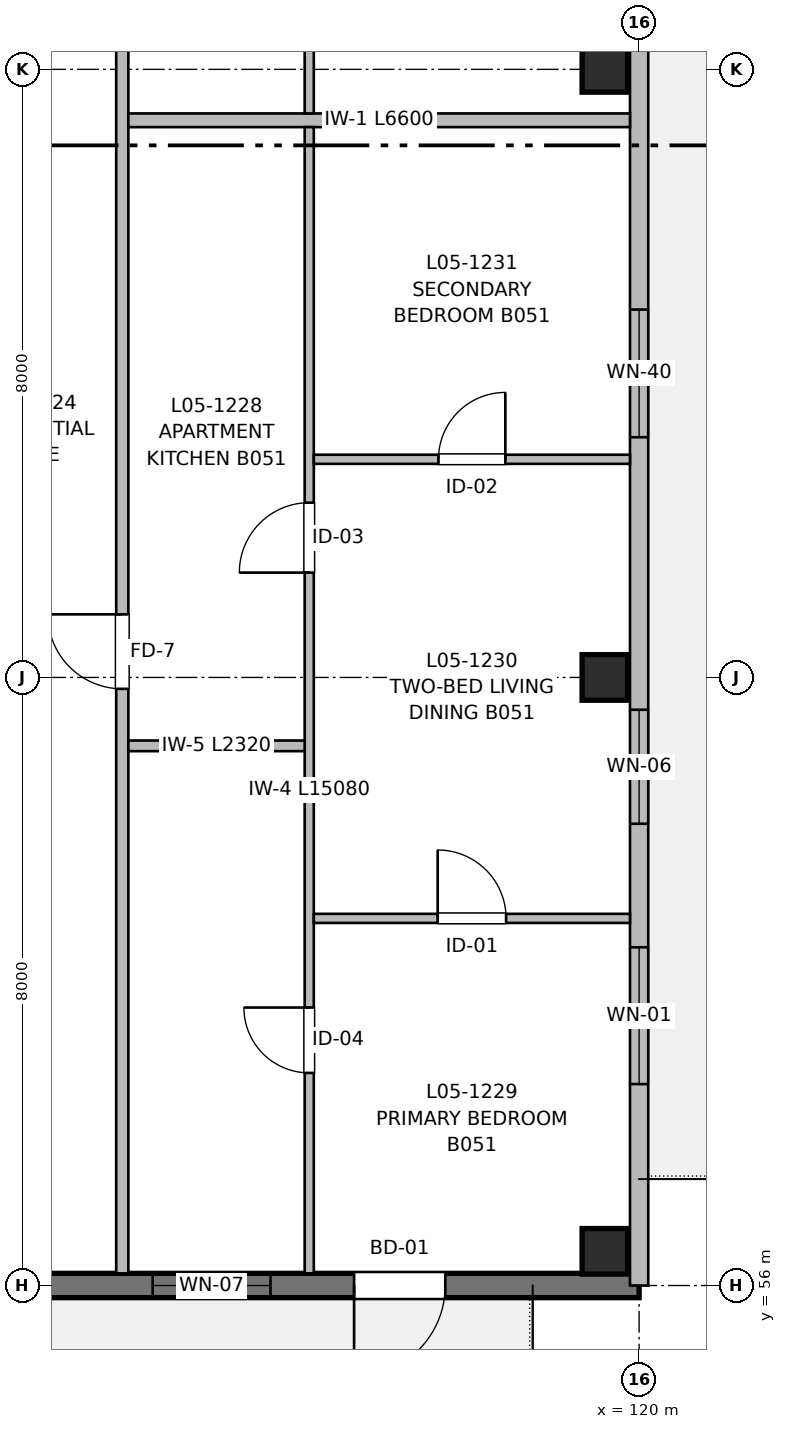
"""IFC4 building model, lengths in metres.
Left out: names, types, materials, properties, quantities, classifications, styles, units other than length and angle.
Written with IfcOpenShell. Run it as: python <this file> out.ifc"""

import sys

from ifc_helpers import new_model, si_unit, direction, frame, frame_2d, origin, origin_2d, place, context, subcontext, project, spatial, rectangle, extrude, element, fill, save


model = new_model("IFC4")
c1 = context("Model", 3, precision=1e-05, world=origin(), true_north=direction((0.0, 1.0)))
c2 = subcontext(c1, "Body", "Model", "MODEL_VIEW")
j1 = project(units=[si_unit("LENGTHUNIT", "METRE"), si_unit("PLANEANGLEUNIT", "RADIAN")], contexts=[c1])
p1 = place(None, origin())
s1 = spatial("IfcSite", under=j1, at=p1, CompositionType="ELEMENT")
p2 = place(p1, origin())
s2 = spatial("IfcBuilding", under=s1, at=p2, CompositionType="ELEMENT")
p3 = place(p2, frame((0.0, 0.0, 16.96)))
s3 = spatial("IfcBuildingStorey", under=s2, at=p3, CompositionType="ELEMENT", Elevation=16.96)
for number, where, z_axis, x_axis in (
    (1, (119.55, 56.45, 0.0), (0.0, 0.0, 1.0), (1.0, 0.0, 0.0)),
    (2, (119.55, 64.0, 0.0), (0.0, 0.0, 1.0), (1.0, 0.0, 0.0)),
    (3, (119.55, 72.0, 0.0), (0.0, 0.0, 1.0), (1.0, 0.0, 0.0)),
):
    element("IfcColumn", number, at=place(p3, frame(where, z_axis=z_axis, x_axis=x_axis)), inside=s3, PredefinedType="COLUMN", context=c2, shape_type="SweptSolid", body=[
        extrude(rectangle(XDim=0.6, YDim=0.6, at=origin_2d()), origin(), (0.0, 0.0, 1.0), 3.2),
    ])
p4 = place(p3, frame((120.0, 56.0, 0.0), z_axis=(0.0, 0.0, 1.0), x_axis=(-1.0, 0.0, 0.0)))
e4 = element("IfcWall", 4, at=p4, inside=s3, PredefinedType="SHEAR", context=c2, shape_type="SweptSolid", body=[
    extrude(rectangle(XDim=16.0, YDim=0.32, at=frame_2d((8.0, 0.0))), origin(), (0.0, 0.0, 1.0), 2.98),
])
p5 = place(p4, frame((2.55, 0.0, 0.0)))
e5 = element("IfcOpeningElement", 5, at=p5, cuts=e4, PredefinedType="OPENING", context=c2, shape_type="SweptSolid", body=[
    extrude(rectangle(XDim=1.2, YDim=2.2, at=frame_2d((0.6, 1.1))), frame((0.0, 0.17, 0.0), z_axis=(0.0, -1.0, 0.0), x_axis=(1.0, 0.0, 0.0)), (0.0, 0.0, 1.0), 0.34),
])
p6 = place(p4, frame((4.85, 0.0, 0.82)))
e6 = element("IfcOpeningElement", 6, at=p6, cuts=e4, PredefinedType="OPENING", context=c2, shape_type="SweptSolid", body=[
    extrude(rectangle(XDim=1.55, YDim=1.4, at=frame_2d((0.775, 0.7))), frame((0.0, 0.17, 0.0), z_axis=(0.0, -1.0, 0.0), x_axis=(1.0, 0.0, 0.0)), (0.0, 0.0, 1.0), 0.34),
])
p7 = place(p4, frame((10.7, 0.0, 0.67)))
e7 = element("IfcOpeningElement", 7, at=p7, cuts=e4, PredefinedType="OPENING", context=c2, shape_type="SweptSolid", body=[
    extrude(rectangle(XDim=2.6, YDim=1.55, at=frame_2d((1.3, 0.775))), frame((0.0, 0.17, 0.0), z_axis=(0.0, -1.0, 0.0), x_axis=(1.0, 0.0, 0.0)), (0.0, 0.0, 1.0), 0.34),
])
p8 = place(p3, frame((120.0, 88.0, 0.0), z_axis=(0.0, 0.0, 1.0), x_axis=(0.0, -1.0, 0.0)))
e8 = element("IfcWall", 8, at=p8, inside=s3, PredefinedType="SOLIDWALL", context=c2, shape_type="SweptSolid", body=[
    extrude(rectangle(XDim=32.0, YDim=0.24, at=frame_2d((16.0, 0.0))), origin(), (0.0, 0.0, 1.0), 2.98),
])
p9 = place(p8, frame((3.4, 0.0, 0.0)))
e9 = element("IfcOpeningElement", 9, at=p9, cuts=e8, PredefinedType="OPENING", context=c2, shape_type="SweptSolid", body=[
    extrude(rectangle(XDim=1.2, YDim=2.2, at=frame_2d((0.6, 1.1))), frame((0.0, 0.13, 0.0), z_axis=(0.0, -1.0, 0.0), x_axis=(1.0, 0.0, 0.0)), (0.0, 0.0, 1.0), 0.26),
])
p10 = place(p8, frame((4.85, 0.0, 0.82)))
e10 = element("IfcOpeningElement", 10, at=p10, cuts=e8, PredefinedType="OPENING", context=c2, shape_type="SweptSolid", body=[
    extrude(rectangle(XDim=1.55, YDim=1.4, at=frame_2d((0.775, 0.7))), frame((0.0, 0.13, 0.0), z_axis=(0.0, -1.0, 0.0), x_axis=(1.0, 0.0, 0.0)), (0.0, 0.0, 1.0), 0.26),
])
p11 = place(p8, frame((9.4, 0.0, 0.67)))
e11 = element("IfcOpeningElement", 11, at=p11, cuts=e8, PredefinedType="OPENING", context=c2, shape_type="SweptSolid", body=[
    extrude(rectangle(XDim=2.6, YDim=1.55, at=frame_2d((1.3, 0.775))), frame((0.0, 0.13, 0.0), z_axis=(0.0, -1.0, 0.0), x_axis=(1.0, 0.0, 0.0)), (0.0, 0.0, 1.0), 0.26),
])
p12 = place(p8, frame((19.16, 0.0, 0.72)))
e12 = element("IfcOpeningElement", 12, at=p12, cuts=e8, PredefinedType="OPENING", context=c2, shape_type="SweptSolid", body=[
    extrude(rectangle(XDim=1.68, YDim=1.5, at=frame_2d((0.84, 0.75))), frame((0.0, 0.13, 0.0), z_axis=(0.0, -1.0, 0.0), x_axis=(1.0, 0.0, 0.0)), (0.0, 0.0, 1.0), 0.26),
])
p13 = place(p8, frame((27.55, 0.0, 0.72)))
e13 = element("IfcOpeningElement", 13, at=p13, cuts=e8, PredefinedType="OPENING", context=c2, shape_type="SweptSolid", body=[
    extrude(rectangle(XDim=1.8, YDim=1.5, at=frame_2d((0.9, 0.75))), frame((0.0, 0.13, 0.0), z_axis=(0.0, -1.0, 0.0), x_axis=(1.0, 0.0, 0.0)), (0.0, 0.0, 1.0), 0.26),
])
p14 = place(p8, frame((24.425, 0.0, 0.82)))
e14 = element("IfcOpeningElement", 14, at=p14, cuts=e8, PredefinedType="OPENING", context=c2, shape_type="SweptSolid", body=[
    extrude(rectangle(XDim=1.5, YDim=1.4, at=frame_2d((0.75, 0.7))), frame((0.0, 0.13, 0.0), z_axis=(0.0, -1.0, 0.0), x_axis=(1.0, 0.0, 0.0)), (0.0, 0.0, 1.0), 0.26),
])
p15 = place(p8, frame((13.69, 0.0, 0.82)))
e15 = element("IfcOpeningElement", 15, at=p15, cuts=e8, PredefinedType="OPENING", context=c2, shape_type="SweptSolid", body=[
    extrude(rectangle(XDim=1.5, YDim=1.4, at=frame_2d((0.75, 0.7))), frame((0.0, 0.13, 0.0), z_axis=(0.0, -1.0, 0.0), x_axis=(1.0, 0.0, 0.0)), (0.0, 0.0, 1.0), 0.26),
])
p16 = place(p8, frame((0.555, 0.0, 0.82)))
e16 = element("IfcOpeningElement", 16, at=p16, cuts=e8, PredefinedType="OPENING", context=c2, shape_type="SweptSolid", body=[
    extrude(rectangle(XDim=1.5, YDim=1.4, at=frame_2d((0.75, 0.7))), frame((0.0, 0.13, 0.0), z_axis=(0.0, -1.0, 0.0), x_axis=(1.0, 0.0, 0.0)), (0.0, 0.0, 1.0), 0.26),
])
p17 = place(p3, frame((113.2, 56.16, 0.0), z_axis=(0.0, 0.0, 1.0), x_axis=(0.0, 1.0, 0.0)))
e17 = element("IfcWall", 17, at=p17, inside=s3, PredefinedType="PARTITIONING", context=c2, shape_type="SweptSolid", body=[
    extrude(rectangle(XDim=50.64, YDim=0.16, at=frame_2d((25.32, 0.0))), origin(), (0.0, 0.0, 1.0), 2.935),
])
p18 = place(p17, frame((7.69, 0.0, 0.0)))
e18 = element("IfcOpeningElement", 18, at=p18, cuts=e17, PredefinedType="OPENING", context=c2, shape_type="SweptSolid", body=[
    extrude(rectangle(XDim=0.98, YDim=2.15, at=frame_2d((0.49, 1.075))), frame((0.0, 0.09, 0.0), z_axis=(0.0, -1.0, 0.0), x_axis=(1.0, 0.0, 0.0)), (0.0, 0.0, 1.0), 0.18),
])
p19 = place(p17, frame((22.44, 0.0, 0.0)))
e19 = element("IfcOpeningElement", 19, at=p19, cuts=e17, PredefinedType="OPENING", context=c2, shape_type="SweptSolid", body=[
    extrude(rectangle(XDim=1.02, YDim=2.15, at=frame_2d((0.51, 1.075))), frame((0.0, 0.09, 0.0), z_axis=(0.0, -1.0, 0.0), x_axis=(1.0, 0.0, 0.0)), (0.0, 0.0, 1.0), 0.18),
])
p20 = place(p17, frame((35.66, 0.0, 0.0)))
e20 = element("IfcOpeningElement", 20, at=p20, cuts=e17, PredefinedType="OPENING", context=c2, shape_type="SweptSolid", body=[
    extrude(rectangle(XDim=0.98, YDim=2.15, at=frame_2d((0.49, 1.075))), frame((0.0, 0.09, 0.0), z_axis=(0.0, -1.0, 0.0), x_axis=(1.0, 0.0, 0.0)), (0.0, 0.0, 1.0), 0.18),
])
p21 = place(p17, frame((46.44, 0.0, 0.0)))
e21 = element("IfcOpeningElement", 21, at=p21, cuts=e17, PredefinedType="OPENING", context=c2, shape_type="SweptSolid", body=[
    extrude(rectangle(XDim=0.98, YDim=2.15, at=frame_2d((0.49, 1.075))), frame((0.0, 0.09, 0.0), z_axis=(0.0, -1.0, 0.0), x_axis=(1.0, 0.0, 0.0)), (0.0, 0.0, 1.0), 0.18),
])
p22 = place(p3, frame((113.28, 71.33, 0.0), z_axis=(0.0, 0.0, 1.0), x_axis=(1.0, 0.0, 0.0)))
e22 = element("IfcWall", 22, at=p22, inside=s3, PredefinedType="PARTITIONING", context=c2, shape_type="SweptSolid", body=[
    extrude(rectangle(XDim=6.6, YDim=0.18, at=frame_2d((3.3, 0.0))), origin(), (0.0, 0.0, 1.0), 2.935),
])
p23 = place(p3, frame((115.66, 56.16, 0.0), z_axis=(0.0, 0.0, 1.0), x_axis=(0.0, 1.0, 0.0)))
e23 = element("IfcWall", 23, at=p23, inside=s3, PredefinedType="PARTITIONING", context=c2, shape_type="SweptSolid", body=[
    extrude(rectangle(XDim=15.08, YDim=0.12, at=frame_2d((7.54, 0.0))), origin(), (0.0, 0.0, 1.0), 2.935),
])
p24 = place(p23, frame((2.637, 0.0, 0.0)))
e24 = element("IfcOpeningElement", 24, at=p24, cuts=e23, PredefinedType="OPENING", context=c2, shape_type="SweptSolid", body=[
    extrude(rectangle(XDim=0.86, YDim=2.1, at=frame_2d((0.43, 1.05))), frame((0.0, 0.07, 0.0), z_axis=(0.0, -1.0, 0.0), x_axis=(1.0, 0.0, 0.0)), (0.0, 0.0, 1.0), 0.14),
])
p25 = place(p23, frame((9.219, 0.0, 0.0)))
e25 = element("IfcOpeningElement", 25, at=p25, cuts=e23, PredefinedType="OPENING", context=c2, shape_type="SweptSolid", body=[
    extrude(rectangle(XDim=0.92, YDim=2.1, at=frame_2d((0.46, 1.05))), frame((0.0, 0.07, 0.0), z_axis=(0.0, -1.0, 0.0), x_axis=(1.0, 0.0, 0.0)), (0.0, 0.0, 1.0), 0.14),
])
p26 = place(p3, frame((113.28, 63.1, 0.0), z_axis=(0.0, 0.0, 1.0), x_axis=(1.0, 0.0, 0.0)))
e26 = element("IfcWall", 26, at=p26, inside=s3, PredefinedType="PARTITIONING", context=c2, shape_type="SweptSolid", body=[
    extrude(rectangle(XDim=2.32, YDim=0.14, at=frame_2d((1.16, 0.0))), origin(), (0.0, 0.0, 1.0), 2.935),
])
p27 = place(p3, frame((115.72, 60.83, 0.0), z_axis=(0.0, 0.0, 1.0), x_axis=(1.0, 0.0, 0.0)))
e27 = element("IfcWall", 27, at=p27, inside=s3, PredefinedType="PARTITIONING", context=c2, shape_type="SweptSolid", body=[
    extrude(rectangle(XDim=4.16, YDim=0.12, at=frame_2d((2.08, 0.0))), origin(), (0.0, 0.0, 1.0), 2.935),
])
p28 = place(p27, frame((1.63, 0.0, 0.0)))
e28 = element("IfcOpeningElement", 28, at=p28, cuts=e27, PredefinedType="OPENING", context=c2, shape_type="SweptSolid", body=[
    extrude(rectangle(XDim=0.9, YDim=2.1, at=frame_2d((0.45, 1.05))), frame((0.0, 0.07, 0.0), z_axis=(0.0, -1.0, 0.0), x_axis=(1.0, 0.0, 0.0)), (0.0, 0.0, 1.0), 0.14),
])
p29 = place(p3, frame((115.72, 66.87, 0.0), z_axis=(0.0, 0.0, 1.0), x_axis=(1.0, 0.0, 0.0)))
e29 = element("IfcWall", 29, at=p29, inside=s3, PredefinedType="PARTITIONING", context=c2, shape_type="SweptSolid", body=[
    extrude(rectangle(XDim=4.16, YDim=0.12, at=frame_2d((2.08, 0.0))), origin(), (0.0, 0.0, 1.0), 2.935),
])
p30 = place(p29, frame((1.64, 0.0, 0.0)))
e30 = element("IfcOpeningElement", 30, at=p30, cuts=e29, PredefinedType="OPENING", context=c2, shape_type="SweptSolid", body=[
    extrude(rectangle(XDim=0.88, YDim=2.1, at=frame_2d((0.44, 1.05))), frame((0.0, 0.07, 0.0), z_axis=(0.0, -1.0, 0.0), x_axis=(1.0, 0.0, 0.0)), (0.0, 0.0, 1.0), 0.14),
])
p31 = place(p3, frame((115.66, 71.42, 0.0), z_axis=(0.0, 0.0, 1.0), x_axis=(0.0, 1.0, 0.0)))
e31 = element("IfcWall", 31, at=p31, inside=s3, PredefinedType="PARTITIONING", context=c2, shape_type="SweptSolid", body=[
    extrude(rectangle(XDim=13.97, YDim=0.12, at=frame_2d((6.985, 0.0))), origin(), (0.0, 0.0, 1.0), 2.935),
])
p32 = place(p31, frame((2.443, 0.0, 0.0)))
e32 = element("IfcOpeningElement", 32, at=p32, cuts=e31, PredefinedType="OPENING", context=c2, shape_type="SweptSolid", body=[
    extrude(rectangle(XDim=0.94, YDim=2.1, at=frame_2d((0.47, 1.05))), frame((0.0, 0.07, 0.0), z_axis=(0.0, -1.0, 0.0), x_axis=(1.0, 0.0, 0.0)), (0.0, 0.0, 1.0), 0.14),
])
p33 = place(p31, frame((8.541, 0.0, 0.0)))
e33 = element("IfcOpeningElement", 33, at=p33, cuts=e31, PredefinedType="OPENING", context=c2, shape_type="SweptSolid", body=[
    extrude(rectangle(XDim=0.92, YDim=2.1, at=frame_2d((0.46, 1.05))), frame((0.0, 0.07, 0.0), z_axis=(0.0, -1.0, 0.0), x_axis=(1.0, 0.0, 0.0)), (0.0, 0.0, 1.0), 0.14),
])
p34 = place(p5, origin())
e34 = element("IfcDoor", 34, at=p34, inside=s3, OperationType="SINGLE_SWING_RIGHT", PredefinedType="DOOR", context=c2, shape_type="SweptSolid", body=[
    extrude(rectangle(XDim=1.2, YDim=2.2, at=frame_2d((0.6, 1.1))), frame((0.0, 0.025, 0.0), z_axis=(0.0, -1.0, 0.0), x_axis=(1.0, 0.0, 0.0)), (0.0, 0.0, 1.0), 0.05),
])
fill(e5, e34)
p35 = place(p6, origin())
e35 = element("IfcWindow", 35, at=p35, inside=s3, PartitioningType="SINGLE_PANEL", PredefinedType="WINDOW", context=c2, shape_type="SweptSolid", body=[
    extrude(rectangle(XDim=1.55, YDim=1.4, at=frame_2d((0.775, 0.7))), frame((0.0, 0.03, 0.0), z_axis=(0.0, -1.0, 0.0), x_axis=(1.0, 0.0, 0.0)), (0.0, 0.0, 1.0), 0.06),
])
fill(e6, e35)
p36 = place(p12, origin())
e36 = element("IfcWindow", 36, at=p36, inside=s3, PartitioningType="SINGLE_PANEL", PredefinedType="WINDOW", context=c2, shape_type="SweptSolid", body=[
    extrude(rectangle(XDim=1.68, YDim=1.5, at=frame_2d((0.84, 0.75))), frame((0.0, 0.03, 0.0), z_axis=(0.0, -1.0, 0.0), x_axis=(1.0, 0.0, 0.0)), (0.0, 0.0, 1.0), 0.06),
])
fill(e12, e36)
p37 = place(p13, origin())
e37 = element("IfcWindow", 37, at=p37, inside=s3, PartitioningType="SINGLE_PANEL", PredefinedType="WINDOW", context=c2, shape_type="SweptSolid", body=[
    extrude(rectangle(XDim=1.8, YDim=1.5, at=frame_2d((0.9, 0.75))), frame((0.0, 0.03, 0.0), z_axis=(0.0, -1.0, 0.0), x_axis=(1.0, 0.0, 0.0)), (0.0, 0.0, 1.0), 0.06),
])
fill(e13, e37)
p38 = place(p24, origin())
e38 = element("IfcDoor", 38, at=p38, inside=s3, OperationType="SINGLE_SWING_RIGHT", PredefinedType="DOOR", context=c2, shape_type="SweptSolid", body=[
    extrude(rectangle(XDim=0.86, YDim=2.1, at=frame_2d((0.43, 1.05))), frame((0.0, 0.025, 0.0), z_axis=(0.0, -1.0, 0.0), x_axis=(1.0, 0.0, 0.0)), (0.0, 0.0, 1.0), 0.05),
])
fill(e24, e38)
p39 = place(p25, origin())
e39 = element("IfcDoor", 39, at=p39, inside=s3, OperationType="SINGLE_SWING_LEFT", PredefinedType="DOOR", context=c2, shape_type="SweptSolid", body=[
    extrude(rectangle(XDim=0.92, YDim=2.1, at=frame_2d((0.46, 1.05))), frame((0.0, 0.025, 0.0), z_axis=(0.0, -1.0, 0.0), x_axis=(1.0, 0.0, 0.0)), (0.0, 0.0, 1.0), 0.05),
])
fill(e25, e39)
p40 = place(p18, origin())
e40 = element("IfcDoor", 40, at=p40, inside=s3, OperationType="SINGLE_SWING_RIGHT", PredefinedType="DOOR", context=c2, shape_type="SweptSolid", body=[
    extrude(rectangle(XDim=0.98, YDim=2.15, at=frame_2d((0.49, 1.075))), frame((0.0, 0.025, 0.0), z_axis=(0.0, -1.0, 0.0), x_axis=(1.0, 0.0, 0.0)), (0.0, 0.0, 1.0), 0.05),
])
fill(e18, e40)
p41 = place(p28, origin())
e41 = element("IfcDoor", 41, at=p41, inside=s3, OperationType="SINGLE_SWING_LEFT", PredefinedType="DOOR", context=c2, shape_type="SweptSolid", body=[
    extrude(rectangle(XDim=0.9, YDim=2.1, at=frame_2d((0.45, 1.05))), frame((0.0, 0.025, 0.0), z_axis=(0.0, -1.0, 0.0), x_axis=(1.0, 0.0, 0.0)), (0.0, 0.0, 1.0), 0.05),
])
fill(e28, e41)
p42 = place(p30, origin())
e42 = element("IfcDoor", 42, at=p42, inside=s3, OperationType="SINGLE_SWING_RIGHT", PredefinedType="DOOR", context=c2, shape_type="SweptSolid", body=[
    extrude(rectangle(XDim=0.88, YDim=2.1, at=frame_2d((0.44, 1.05))), frame((0.0, 0.025, 0.0), z_axis=(0.0, -1.0, 0.0), x_axis=(1.0, 0.0, 0.0)), (0.0, 0.0, 1.0), 0.05),
])
fill(e30, e42)
p43 = place(p14, origin())
e43 = element("IfcWindow", 43, at=p43, inside=s3, PartitioningType="SINGLE_PANEL", PredefinedType="WINDOW", context=c2, shape_type="SweptSolid", body=[
    extrude(rectangle(XDim=1.5, YDim=1.4, at=frame_2d((0.75, 0.7))), frame((0.0, 0.03, 0.0), z_axis=(0.0, -1.0, 0.0), x_axis=(1.0, 0.0, 0.0)), (0.0, 0.0, 1.0), 0.06),
])
fill(e14, e43)
save(model, sys.argv[1])
